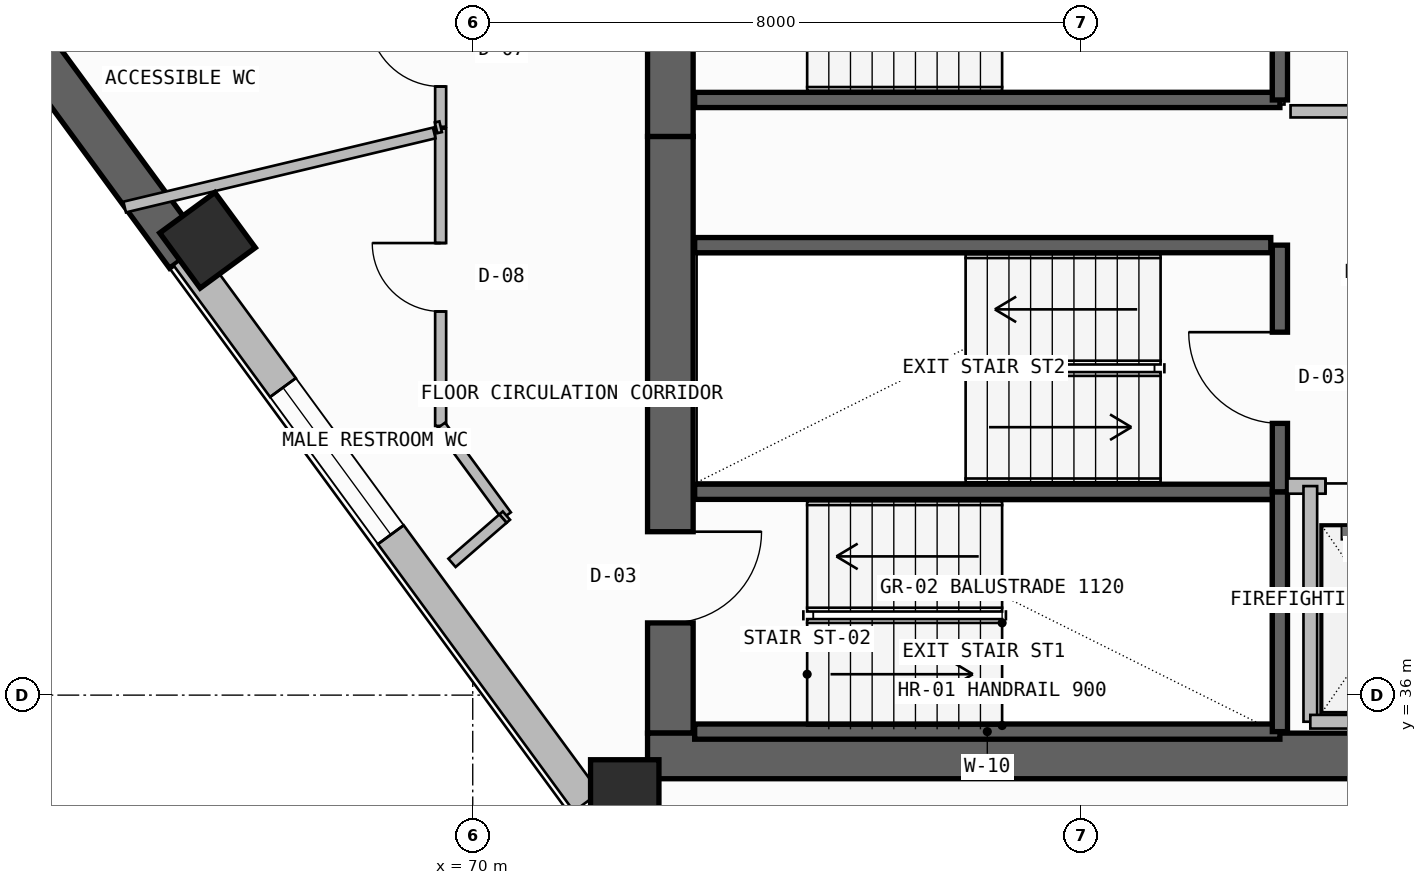
"""IFC4 building model, lengths in metres.
Left out: names, types, materials, properties, quantities, classifications, styles, units other than length and angle.
Written with IfcOpenShell. Run it as: python <this file> out.ifc"""

import sys

from ifc_helpers import new_model, si_unit, direction, frame, frame_2d, origin, origin_2d, place, context, subcontext, project, spatial, rectangle, extrude, element, fill, save


model = new_model("IFC4")
c1 = context("Model", 3, precision=1e-05, world=origin(), true_north=direction((0.0, 1.0)))
c2 = subcontext(c1, "Body", "Model", "MODEL_VIEW")
j1 = project(units=[si_unit("LENGTHUNIT", "METRE"), si_unit("PLANEANGLEUNIT", "RADIAN")], contexts=[c1])
p1 = place(None, origin())
s1 = spatial("IfcSite", under=j1, at=p1, CompositionType="ELEMENT")
p2 = place(p1, origin())
s2 = spatial("IfcBuilding", under=s1, at=p2, CompositionType="ELEMENT")
p3 = place(p2, frame((0.0, 0.0, 239.62)))
s3 = spatial("IfcBuildingStorey", under=s2, at=p3, CompositionType="ELEMENT", Elevation=239.62)
p4 = place(p3, frame((72.6, 35.5, -0.26), z_axis=(0.0, 0.0, 1.0), x_axis=(0.0, 1.0, 0.0)))
e1 = element("IfcWall", 1, at=p4, inside=s3, PredefinedType="SHEAR", context=c2, shape_type="SweptSolid", body=[
    extrude(rectangle(XDim=7.85, YDim=0.6, at=frame_2d((3.925, 0.0))), origin(), (0.0, 0.0, 1.0), 3.52),
])
p5 = place(p4, frame((1.45, 0.0, 0.26)))
e2 = element("IfcOpeningElement", 2, at=p5, cuts=e1, PredefinedType="OPENING", context=c2, shape_type="SweptSolid", body=[
    extrude(rectangle(XDim=1.2, YDim=2.2, at=frame_2d((0.6, 1.1))), frame((0.0, 0.31, 0.0), z_axis=(0.0, -1.0, 0.0), x_axis=(1.0, 0.0, 0.0)), (0.0, 0.0, 1.0), 0.62),
])
p6 = place(p3, frame((72.3, 35.2, -0.26), z_axis=(0.0, 0.0, 1.0), x_axis=(1.0, 0.0, 0.0)))
e3 = element("IfcWall", 3, at=p6, inside=s3, PredefinedType="SHEAR", context=c2, shape_type="SweptSolid", body=[
    extrude(rectangle(XDim=13.3, YDim=0.6, at=frame_2d((6.65, 0.0))), origin(), (0.0, 0.0, 1.0), 3.52),
])
p7 = place(p3, frame((72.6, 43.35, -0.26), z_axis=(0.0, 0.0, 1.0), x_axis=(0.0, 1.0, 0.0)))
e4 = element("IfcWall", 4, at=p7, inside=s3, PredefinedType="SHEAR", context=c2, shape_type="SweptSolid", body=[
    extrude(rectangle(XDim=12.7, YDim=0.6, at=frame_2d((6.35, 0.0))), origin(), (0.0, 0.0, 1.0), 3.52),
])
p8 = place(p7, frame((1.35, 0.0, 0.26)))
e5 = element("IfcOpeningElement", 5, at=p8, cuts=e4, PredefinedType="OPENING", context=c2, shape_type="SweptSolid", body=[
    extrude(rectangle(XDim=1.2, YDim=2.2, at=frame_2d((0.6, 1.1))), frame((0.0, 0.31, 0.0), z_axis=(0.0, -1.0, 0.0), x_axis=(1.0, 0.0, 0.0)), (0.0, 0.0, 1.0), 0.62),
])
for number, where, z_axis, x_axis in (
    (6, (72.0, 34.7, 0.0), (0.0, 0.0, 1.0), (1.0, 0.0, 0.0)),
    (7, (66.51, 41.983, 0.0), (0.0, 0.0, 1.0), (-0.591, 0.806, 0.0)),
):
    element("IfcColumn", number, at=place(p3, frame(where, z_axis=z_axis, x_axis=x_axis)), inside=s3, PredefinedType="COLUMN", context=c2, shape_type="SweptSolid", body=[
        extrude(rectangle(XDim=0.9, YDim=0.9, at=origin_2d()), origin(), (0.0, 0.0, 1.0), 3.52),
    ])
p9 = place(p3, frame((55.475, 56.45, -0.26), z_axis=(0.0, 0.0, 1.0), x_axis=(0.591309555876, -0.806444672082, 0.0)))
e8 = element("IfcWall", 8, at=p9, inside=s3, PredefinedType="SHEAR", context=c2, shape_type="SweptSolid", body=[
    extrude(rectangle(XDim=18.192, YDim=0.55, at=frame_2d((9.096, 0.0))), origin(), (0.0, 0.0, 1.0), 3.52),
])
p10 = place(p3, frame((66.232, 41.779, 0.0), z_axis=(0.0, 0.0, 1.0), x_axis=(0.591309008949, -0.806445073105, 0.0)))
e9 = element("IfcWall", 9, at=p10, inside=s3, PredefinedType="SOLIDWALL", context=c2, shape_type="SweptSolid", body=[
    extrude(rectangle(XDim=8.908, YDim=0.42, at=frame_2d((4.454, 0.0))), origin(), (0.0, 0.0, 1.0), 2.645),
])
p11 = place(p10, frame((2.149, 0.0, 1.1)))
e10 = element("IfcOpeningElement", 10, at=p11, cuts=e9, PredefinedType="OPENING", context=c2, shape_type="SweptSolid", body=[
    extrude(rectangle(XDim=2.4, YDim=1.2, at=frame_2d((1.2, 0.6))), frame((0.0, 0.22, 0.0), z_axis=(0.0, -1.0, 0.0), x_axis=(1.0, 0.0, 0.0)), (0.0, 0.0, 1.0), 0.44),
])
for number, where, z_axis, x_axis in (
    (11, (72.92, 35.52, -0.26), (0.0, 0.0, 1.0), (1.0, 0.0, 0.0)),
    (12, (72.92, 38.675, -0.26), (0.0, 0.0, 1.0), (1.0, 0.0, 0.0)),
):
    element("IfcWall", number, at=place(p3, frame(where, z_axis=z_axis, x_axis=x_axis)), inside=s3, PredefinedType="SOLIDWALL", context=c2, shape_type="SweptSolid", body=[
        extrude(rectangle(XDim=7.7, YDim=0.2, at=frame_2d((3.85, 0.0))), origin(), (0.0, 0.0, 1.0), 3.52),
    ])
p12 = place(p3, frame((80.62, 35.52, -0.26), z_axis=(0.0, 0.0, 1.0), x_axis=(0.0, 1.0, 0.0)))
e13 = element("IfcWall", 13, at=p12, inside=s3, PredefinedType="SOLIDWALL", context=c2, shape_type="SweptSolid", body=[
    extrude(rectangle(XDim=3.155, YDim=0.2, at=frame_2d((1.578, 0.0))), origin(), (0.0, 0.0, 1.0), 3.52),
])
p13 = place(p3, frame((80.62, 38.675, -0.26), z_axis=(0.0, 0.0, 1.0), x_axis=(0.0, 1.0, 0.0)))
e14 = element("IfcWall", 14, at=p13, inside=s3, PredefinedType="SOLIDWALL", context=c2, shape_type="SweptSolid", body=[
    extrude(rectangle(XDim=3.245, YDim=0.2, at=frame_2d((1.623, 0.0))), origin(), (0.0, 0.0, 1.0), 3.52),
])
p14 = place(p13, frame((0.9, 0.0, 0.26)))
e15 = element("IfcOpeningElement", 15, at=p14, cuts=e14, PredefinedType="OPENING", context=c2, shape_type="SweptSolid", body=[
    extrude(rectangle(XDim=1.2, YDim=2.2, at=frame_2d((0.6, 1.1))), frame((0.0, 0.11, 0.0), z_axis=(0.0, -1.0, 0.0), x_axis=(1.0, 0.0, 0.0)), (0.0, 0.0, 1.0), 0.22),
])
p15 = place(p3, frame((80.72, 38.75, 0.0), z_axis=(0.0, 0.0, 1.0), x_axis=(1.0, 0.0, 0.0)))
e16 = element("IfcWall", 16, at=p15, inside=s3, PredefinedType="SOLIDWALL", context=c2, shape_type="SweptSolid", body=[
    extrude(rectangle(XDim=4.26, YDim=0.2, at=frame_2d((2.13, 0.0))), origin(), (0.0, 0.0, 1.0), 3.26),
])
p16 = place(p15, frame((0.5, 0.0, 0.0)))
e17 = element("IfcOpeningElement", 17, at=p16, cuts=e16, PredefinedType="OPENING", context=c2, shape_type="SweptSolid", body=[
    extrude(rectangle(XDim=1.3, YDim=2.3, at=frame_2d((0.65, 1.15))), frame((0.0, 0.11, 0.0), z_axis=(0.0, -1.0, 0.0), x_axis=(1.0, 0.0, 0.0)), (0.0, 0.0, 1.0), 0.22),
])
p17 = place(p15, frame((2.45, 0.0, 0.0)))
e18 = element("IfcOpeningElement", 18, at=p17, cuts=e16, PredefinedType="OPENING", context=c2, shape_type="SweptSolid", body=[
    extrude(rectangle(XDim=1.3, YDim=2.3, at=frame_2d((0.65, 1.15))), frame((0.0, 0.11, 0.0), z_axis=(0.0, -1.0, 0.0), x_axis=(1.0, 0.0, 0.0)), (0.0, 0.0, 1.0), 0.22),
])
p18 = place(p3, frame((81.02, 35.65, 0.0), z_axis=(0.0, 0.0, 1.0), x_axis=(0.0, 1.0, 0.0)))
e19 = element("IfcWall", 19, at=p18, inside=s3, PredefinedType="SOLIDWALL", context=c2, shape_type="SweptSolid", body=[
    extrude(rectangle(XDim=3.1, YDim=0.18, at=frame_2d((1.55, 0.0))), origin(), (0.0, 0.0, 1.0), 3.26),
])
p19 = place(p3, frame((81.02, 35.65, 0.0), z_axis=(0.0, 0.0, 1.0), x_axis=(1.0, 0.0, 0.0)))
e20 = element("IfcWall", 20, at=p19, inside=s3, PredefinedType="SOLIDWALL", context=c2, shape_type="SweptSolid", body=[
    extrude(rectangle(XDim=3.93, YDim=0.18, at=frame_2d((1.965, 0.0))), origin(), (0.0, 0.0, 1.0), 3.26),
])
p20 = place(p3, frame((72.92, 41.92, -0.26), z_axis=(0.0, 0.0, 1.0), x_axis=(1.0, 0.0, 0.0)))
e21 = element("IfcWall", 21, at=p20, inside=s3, PredefinedType="SOLIDWALL", context=c2, shape_type="SweptSolid", body=[
    extrude(rectangle(XDim=7.58, YDim=0.2, at=frame_2d((3.79, 0.0))), origin(), (0.0, 0.0, 1.0), 3.52),
])
p21 = place(p3, frame((72.92, 43.83, -0.26), z_axis=(0.0, 0.0, 1.0), x_axis=(1.0, 0.0, 0.0)))
e22 = element("IfcWall", 22, at=p21, inside=s3, PredefinedType="SOLIDWALL", context=c2, shape_type="SweptSolid", body=[
    extrude(rectangle(XDim=7.7, YDim=0.2, at=frame_2d((3.85, 0.0))), origin(), (0.0, 0.0, 1.0), 3.52),
])
p22 = place(p3, frame((80.62, 43.83, -0.26), z_axis=(0.0, 0.0, 1.0), x_axis=(0.0, 1.0, 0.0)))
e23 = element("IfcWall", 23, at=p22, inside=s3, PredefinedType="SOLIDWALL", context=c2, shape_type="SweptSolid", body=[
    extrude(rectangle(XDim=3.24, YDim=0.2, at=frame_2d((1.62, 0.0))), origin(), (0.0, 0.0, 1.0), 3.52),
])
p23 = place(p3, frame((80.76, 43.68, 0.0), z_axis=(0.0, 0.0, 1.0), x_axis=(1.0, 0.0, 0.0)))
e24 = element("IfcWall", 24, at=p23, inside=s3, PredefinedType="PLUMBINGWALL", context=c2, shape_type="SweptSolid", body=[
    extrude(rectangle(XDim=4.19, YDim=0.16, at=frame_2d((2.095, 0.0))), origin(), (0.0, 0.0, 1.0), 3.26),
])
p24 = place(p3, frame((69.578, 43.453, 0.0), z_axis=(0.0, 0.0, 1.0), x_axis=(0.0, -1.0, 0.0)))
e25 = element("IfcWall", 25, at=p24, inside=s3, PredefinedType="PARTITIONING", context=c2, shape_type="SweptSolid", body=[
    extrude(rectangle(XDim=3.911, YDim=0.145, at=frame_2d((1.956, 0.0))), origin(), (0.0, 0.0, 1.0), 3.26),
])
p25 = place(p24, frame((1.506, 0.0, 0.0)))
e26 = element("IfcOpeningElement", 26, at=p25, cuts=e25, PredefinedType="OPENING", context=c2, shape_type="SweptSolid", body=[
    extrude(rectangle(XDim=0.9, YDim=2.1, at=frame_2d((0.45, 1.05))), frame((0.0, 0.083, 0.0), z_axis=(0.0, -1.0, 0.0), x_axis=(1.0, 0.0, 0.0)), (0.0, 0.0, 1.0), 0.165),
])
p26 = place(p3, frame((69.733, 39.33, 0.0), z_axis=(0.0, 0.0, 1.0), x_axis=(0.591275482142, -0.806469654865, 0.0)))
e27 = element("IfcWall", 27, at=p26, inside=s3, PredefinedType="PARTITIONING", context=c2, shape_type="SweptSolid", body=[
    extrude(rectangle(XDim=1.2, YDim=0.145, at=frame_2d((0.6, 0.0))), origin(), (0.0, 0.0, 1.0), 3.26),
])
p27 = place(p3, frame((69.578, 39.542, 0.0), z_axis=(0.0, 0.0, 1.0), x_axis=(0.591202708834, -0.806523004673, 0.0)))
e28 = element("IfcWall", 28, at=p27, inside=s3, PredefinedType="PARTITIONING", context=c2, shape_type="SweptSolid", body=[
    extrude(rectangle(XDim=0.263, YDim=0.145, at=frame_2d((0.131, 0.0))), origin(), (0.0, 0.0, 1.0), 3.26),
])
p28 = place(p3, frame((70.443, 38.362, 0.0), z_axis=(0.0, 0.0, 1.0), x_axis=(-0.756091313965, -0.654466137357, 0.0)))
e29 = element("IfcWall", 29, at=p28, inside=s3, PredefinedType="PARTITIONING", context=c2, shape_type="SweptSolid", body=[
    extrude(rectangle(XDim=0.06, YDim=0.145, at=frame_2d((0.03, 0.0))), origin(), (0.0, 0.0, 1.0), 3.26),
])
p29 = place(p3, frame((65.421, 42.421, 0.0), z_axis=(0.0, 0.0, 1.0), x_axis=(0.972554805583, 0.232673913744, 0.0)))
e30 = element("IfcWall", 30, at=p29, inside=s3, PredefinedType="PARTITIONING", context=c2, shape_type="SweptSolid", body=[
    extrude(rectangle(XDim=4.188, YDim=0.145, at=frame_2d((2.094, 0.0))), origin(), (0.0, 0.0, 1.0), 2.645),
])
p30 = place(p3, frame((69.578, 45.486, 0.0), z_axis=(0.0, 0.0, 1.0), x_axis=(0.0, -1.0, 0.0)))
e31 = element("IfcWall", 31, at=p30, inside=s3, PredefinedType="PARTITIONING", context=c2, shape_type="SweptSolid", body=[
    extrude(rectangle(XDim=2.009, YDim=0.145, at=frame_2d((1.004, 0.0))), origin(), (0.0, 0.0, 1.0), 3.26),
])
p31 = place(p30, frame((0.529, 0.0, 0.0)))
e32 = element("IfcOpeningElement", 32, at=p31, cuts=e31, PredefinedType="OPENING", context=c2, shape_type="SweptSolid", body=[
    extrude(rectangle(XDim=0.95, YDim=2.15, at=frame_2d((0.475, 1.075))), frame((0.0, 0.083, 0.0), z_axis=(0.0, -1.0, 0.0), x_axis=(1.0, 0.0, 0.0)), (0.0, 0.0, 1.0), 0.165),
])
p32 = place(p3, frame((69.578, 43.478, 0.0), z_axis=(0.0, 0.0, 1.0), x_axis=(-0.974190578374, -0.225727085233, 0.0)))
e33 = element("IfcWall", 33, at=p32, inside=s3, PredefinedType="PARTITIONING", context=c2, shape_type="SweptSolid", body=[
    extrude(rectangle(XDim=0.062, YDim=0.145, at=frame_2d((0.031, 0.0))), origin(), (0.0, 0.0, 1.0), 3.26),
])
p33 = place(p3, frame((70.398, 38.323, 0.0), z_axis=(0.0, 0.0, 1.0), x_axis=(-0.75510831876, -0.655600051053, 0.0)))
e34 = element("IfcWall", 34, at=p33, inside=s3, PredefinedType="PARTITIONING", context=c2, shape_type="SweptSolid", body=[
    extrude(rectangle(XDim=0.888, YDim=0.145, at=frame_2d((0.444, 0.0))), origin(), (0.0, 0.0, 1.0), 3.26),
])
p34 = place(p11, origin())
e35 = element("IfcWindow", 35, at=p34, inside=s3, PartitioningType="SINGLE_PANEL", PredefinedType="WINDOW", context=c2, shape_type="SweptSolid", body=[
    extrude(rectangle(XDim=2.4, YDim=1.2, at=frame_2d((1.2, 0.6))), frame((0.0, 0.03, 0.0), z_axis=(0.0, -1.0, 0.0), x_axis=(1.0, 0.0, 0.0)), (0.0, 0.0, 1.0), 0.06),
])
fill(e10, e35)
p35 = place(p5, frame((1.2, 0.0, 0.0), z_axis=(0.0, 0.0, 1.0), x_axis=(-1.0, 0.0, 0.0)))
e36 = element("IfcDoor", 36, at=p35, inside=s3, OperationType="SINGLE_SWING_LEFT", PredefinedType="USERDEFINED", context=c2, shape_type="SweptSolid", body=[
    extrude(rectangle(XDim=1.2, YDim=2.2, at=frame_2d((0.6, 1.1))), frame((0.0, 0.025, 0.0), z_axis=(0.0, -1.0, 0.0), x_axis=(1.0, 0.0, 0.0)), (0.0, 0.0, 1.0), 0.05),
])
fill(e2, e36)
p36 = place(p14, origin())
e37 = element("IfcDoor", 37, at=p36, inside=s3, OperationType="SINGLE_SWING_RIGHT", PredefinedType="USERDEFINED", context=c2, shape_type="SweptSolid", body=[
    extrude(rectangle(XDim=1.2, YDim=2.2, at=frame_2d((0.6, 1.1))), frame((0.0, 0.025, 0.0), z_axis=(0.0, -1.0, 0.0), x_axis=(1.0, 0.0, 0.0)), (0.0, 0.0, 1.0), 0.05),
])
fill(e15, e37)
p37 = place(p16, origin())
e38 = element("IfcDoor", 38, at=p37, inside=s3, OperationType="DOUBLE_DOOR_SLIDING", PredefinedType="DOOR", context=c2, shape_type="SweptSolid", body=[
    extrude(rectangle(XDim=1.3, YDim=2.3, at=frame_2d((0.65, 1.15))), frame((0.0, 0.025, 0.0), z_axis=(0.0, -1.0, 0.0), x_axis=(1.0, 0.0, 0.0)), (0.0, 0.0, 1.0), 0.05),
])
fill(e17, e38)
p38 = place(p25, frame((0.9, 0.0, 0.0), z_axis=(0.0, 0.0, 1.0), x_axis=(-1.0, 0.0, 0.0)))
e39 = element("IfcDoor", 39, at=p38, inside=s3, OperationType="SINGLE_SWING_RIGHT", PredefinedType="DOOR", context=c2, shape_type="SweptSolid", body=[
    extrude(rectangle(XDim=0.9, YDim=2.1, at=frame_2d((0.45, 1.05))), frame((0.0, 0.025, 0.0), z_axis=(0.0, -1.0, 0.0), x_axis=(1.0, 0.0, 0.0)), (0.0, 0.0, 1.0), 0.05),
])
fill(e26, e39)
p39 = place(p31, frame((0.95, 0.0, 0.0), z_axis=(0.0, 0.0, 1.0), x_axis=(-1.0, 0.0, 0.0)))
e40 = element("IfcDoor", 40, at=p39, inside=s3, OperationType="SINGLE_SWING_RIGHT", PredefinedType="DOOR", context=c2, shape_type="SweptSolid", body=[
    extrude(rectangle(XDim=0.95, YDim=2.15, at=frame_2d((0.475, 1.075))), frame((0.0, 0.025, 0.0), z_axis=(0.0, -1.0, 0.0), x_axis=(1.0, 0.0, 0.0)), (0.0, 0.0, 1.0), 0.05),
])
fill(e32, e40)
save(model, sys.argv[1])
